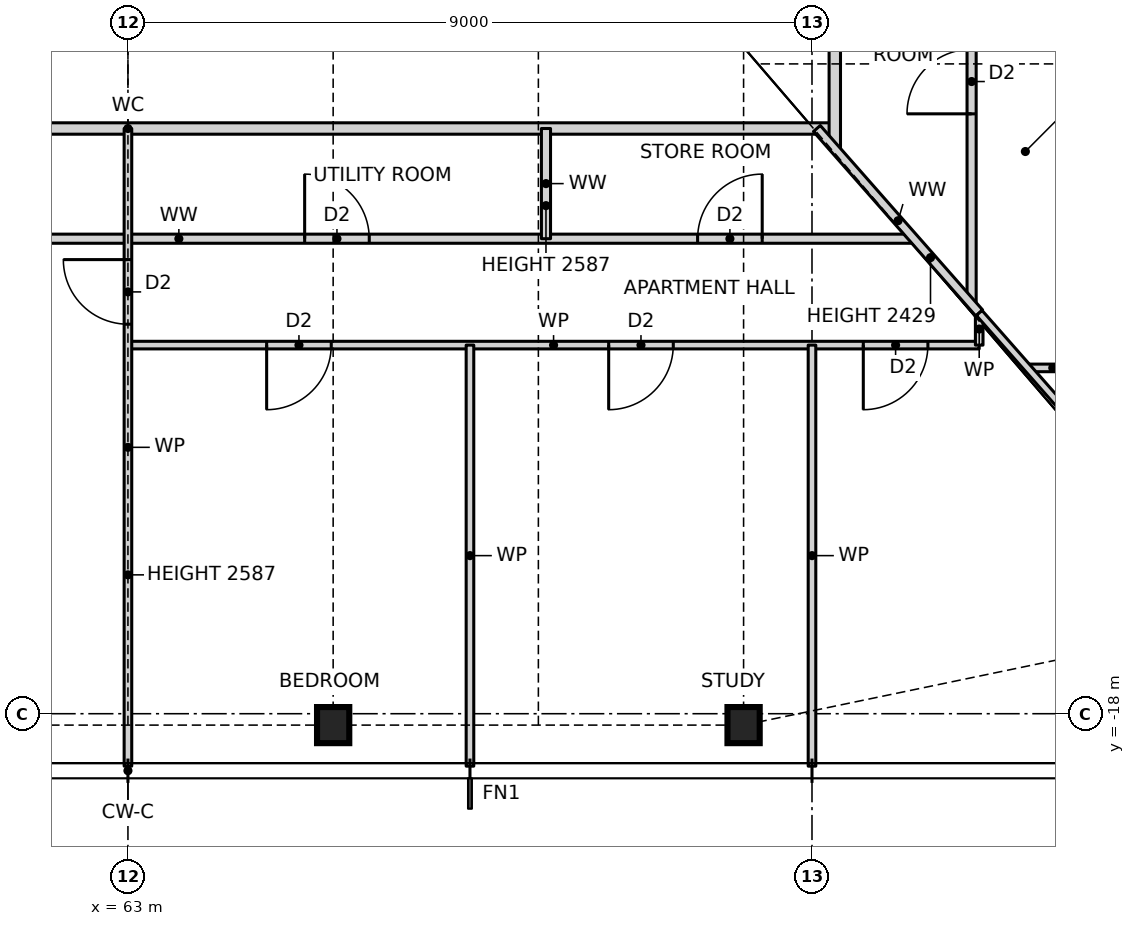
"""IFC4 building model, lengths in metres.
Left out: names, types, materials, properties, quantities, classifications, styles, units other than length and angle.
Written with IfcOpenShell. Run it as: python <this file> out.ifc"""

import sys

from ifc_helpers import new_model, si_unit, direction, frame, frame_2d, origin, origin_2d, place, context, subcontext, project, spatial, rectangle, i_section, extrude, element, fill, save


model = new_model("IFC4")
c1 = context("Model", 3, precision=1e-05, world=origin(), true_north=direction((0.0, 1.0)))
c2 = subcontext(c1, "Body", "Model", "MODEL_VIEW")
j1 = project(units=[si_unit("LENGTHUNIT", "METRE"), si_unit("PLANEANGLEUNIT", "RADIAN")], contexts=[c1])
p1 = place(None, origin())
s1 = spatial("IfcSite", under=j1, at=p1, CompositionType="ELEMENT")
p2 = place(p1, origin())
s2 = spatial("IfcBuilding", under=s1, at=p2, CompositionType="ELEMENT")
p3 = place(p2, frame((0.0, 0.0, 32.5)))
s3 = spatial("IfcBuildingStorey", under=s2, at=p3, CompositionType="ELEMENT", Elevation=32.5)
for number, where, z_axis, x_axis in (
    (1, (65.7, -18.15, 0.0), (0.0, 0.0, 1.0), (1.0, 0.0, 0.0)),
    (2, (71.1, -18.15, 0.0), (0.0, 0.0, 1.0), (1.0, 0.0, 0.0)),
):
    element("IfcColumn", number, at=place(p3, frame(where, z_axis=z_axis, x_axis=x_axis)), inside=s3, PredefinedType="COLUMN", context=c2, shape_type="SweptSolid", body=[
        extrude(i_section(OverallWidth=0.424, OverallDepth=0.475, WebThickness=0.048, FlangeThickness=0.077, at=origin_2d()), origin(), (0.0, 0.0, 1.0), 3.5),
    ])
p4 = place(p3, frame((74.836, -13.45, 0.0), z_axis=(0.0, 0.0, 1.0), x_axis=(1.0, 0.0, 0.0)))
e3 = element("IfcWall", 3, at=p4, inside=s3, PredefinedType="PARTITIONING", context=c2, shape_type="SweptSolid", body=[
    extrude(rectangle(XDim=0.664, YDim=0.1, at=frame_2d((0.332, 0.0))), origin(), (0.0, 0.0, 1.0), 3.27),
])
p5 = place(p3, frame((63.0, -13.15, 0.0), z_axis=(0.0, 0.0, 1.0), x_axis=(1.0, 0.0, 0.0)))
e4 = element("IfcWall", 4, at=p5, inside=s3, PredefinedType="PARTITIONING", context=c2, shape_type="SweptSolid", body=[
    extrude(rectangle(XDim=11.2, YDim=0.1, at=frame_2d((5.6, 0.0))), origin(), (0.0, 0.0, 1.0), 3.27),
])
p6 = place(p5, frame((1.825, 0.0, 0.0)))
e5 = element("IfcOpeningElement", 5, at=p6, cuts=e4, PredefinedType="OPENING", context=c2, shape_type="SweptSolid", body=[
    extrude(rectangle(XDim=0.85, YDim=2.1, at=frame_2d((0.425, 1.05))), frame((0.0, 0.06, 0.0), z_axis=(0.0, -1.0, 0.0), x_axis=(1.0, 0.0, 0.0)), (0.0, 0.0, 1.0), 0.12),
])
p7 = place(p5, frame((6.325, 0.0, 0.0)))
e6 = element("IfcOpeningElement", 6, at=p7, cuts=e4, PredefinedType="OPENING", context=c2, shape_type="SweptSolid", body=[
    extrude(rectangle(XDim=0.85, YDim=2.1, at=frame_2d((0.425, 1.05))), frame((0.0, 0.06, 0.0), z_axis=(0.0, -1.0, 0.0), x_axis=(1.0, 0.0, 0.0)), (0.0, 0.0, 1.0), 0.12),
])
p8 = place(p5, frame((9.675, 0.0, 0.0)))
e7 = element("IfcOpeningElement", 7, at=p8, cuts=e4, PredefinedType="OPENING", context=c2, shape_type="SweptSolid", body=[
    extrude(rectangle(XDim=0.85, YDim=2.1, at=frame_2d((0.425, 1.05))), frame((0.0, 0.06, 0.0), z_axis=(0.0, -1.0, 0.0), x_axis=(1.0, 0.0, 0.0)), (0.0, 0.0, 1.0), 0.12),
])
p9 = place(p3, frame((54.0, -11.75, 0.0), z_axis=(0.0, 0.0, 1.0), x_axis=(1.0, 0.0, 0.0)))
e8 = element("IfcWall", 8, at=p9, inside=s3, PredefinedType="PARTITIONING", context=c2, shape_type="SweptSolid", body=[
    extrude(rectangle(XDim=19.34, YDim=0.12, at=frame_2d((9.67, 0.0))), origin(), (0.0, 0.0, 1.0), 3.27),
])
p10 = place(p9, frame((1.375, 0.0, 0.0)))
e9 = element("IfcOpeningElement", 9, at=p10, cuts=e8, PredefinedType="OPENING", context=c2, shape_type="SweptSolid", body=[
    extrude(rectangle(XDim=0.85, YDim=2.1, at=frame_2d((0.425, 1.05))), frame((0.0, 0.07, 0.0), z_axis=(0.0, -1.0, 0.0), x_axis=(1.0, 0.0, 0.0)), (0.0, 0.0, 1.0), 0.14),
])
p11 = place(p9, frame((4.575, 0.0, 0.0)))
e10 = element("IfcOpeningElement", 10, at=p11, cuts=e8, PredefinedType="OPENING", context=c2, shape_type="SweptSolid", body=[
    extrude(rectangle(XDim=0.85, YDim=2.1, at=frame_2d((0.425, 1.05))), frame((0.0, 0.07, 0.0), z_axis=(0.0, -1.0, 0.0), x_axis=(1.0, 0.0, 0.0)), (0.0, 0.0, 1.0), 0.14),
])
p12 = place(p9, frame((11.325, 0.0, 0.0)))
e11 = element("IfcOpeningElement", 11, at=p12, cuts=e8, PredefinedType="OPENING", context=c2, shape_type="SweptSolid", body=[
    extrude(rectangle(XDim=0.85, YDim=2.1, at=frame_2d((0.425, 1.05))), frame((0.0, 0.07, 0.0), z_axis=(0.0, -1.0, 0.0), x_axis=(1.0, 0.0, 0.0)), (0.0, 0.0, 1.0), 0.14),
])
p13 = place(p9, frame((16.495, 0.0, 0.0)))
e12 = element("IfcOpeningElement", 12, at=p13, cuts=e8, PredefinedType="OPENING", context=c2, shape_type="SweptSolid", body=[
    extrude(rectangle(XDim=0.85, YDim=2.1, at=frame_2d((0.425, 1.05))), frame((0.0, 0.07, 0.0), z_axis=(0.0, -1.0, 0.0), x_axis=(1.0, 0.0, 0.0)), (0.0, 0.0, 1.0), 0.14),
])
p14 = place(p3, frame((53.7, -10.3, 0.0), z_axis=(0.0, 0.0, 1.0), x_axis=(1.0, 0.0, 0.0)))
e13 = element("IfcWall", 13, at=p14, inside=s3, PredefinedType="PARTITIONING", context=c2, shape_type="SweptSolid", body=[
    extrude(rectangle(XDim=18.6, YDim=0.15, at=frame_2d((9.3, 0.0))), origin(), (0.0, 0.0, 1.0), 3.27),
])
p15 = place(p14, frame((4.8, 0.0, 0.0)))
e14 = element("IfcOpeningElement", 14, at=p15, cuts=e13, PredefinedType="OPENING", context=c2, shape_type="SweptSolid", body=[
    extrude(rectangle(XDim=1.0, YDim=2.1, at=frame_2d((0.5, 1.05))), frame((0.0, 0.085, 0.0), z_axis=(0.0, -1.0, 0.0), x_axis=(1.0, 0.0, 0.0)), (0.0, 0.0, 1.0), 0.17),
])
p16 = place(p3, frame((74.2, -13.15, 0.0), z_axis=(0.0, 0.0, 1.0), x_axis=(0.0, 1.0, 0.0)))
e15 = element("IfcWall", 15, at=p16, inside=s3, PredefinedType="PARTITIONING", context=c2, shape_type="SweptSolid", body=[
    extrude(rectangle(XDim=0.423, YDim=0.1, at=frame_2d((0.211, 0.0))), origin(), (0.0, 0.0, 1.0), 3.27),
])
p17 = place(p3, frame((74.1, -12.614, 0.0), z_axis=(0.0, 0.0, 1.0), x_axis=(0.0, 1.0, 0.0)))
e16 = element("IfcWall", 16, at=p17, inside=s3, PredefinedType="PARTITIONING", context=c2, shape_type="SweptSolid", body=[
    extrude(rectangle(XDim=25.228, YDim=0.12, at=frame_2d((12.614, 0.0))), origin(), (0.0, 0.0, 1.0), 3.27),
])
p18 = place(p17, frame((7.239, 0.0, 0.0)))
e17 = element("IfcOpeningElement", 17, at=p18, cuts=e16, PredefinedType="OPENING", context=c2, shape_type="SweptSolid", body=[
    extrude(rectangle(XDim=0.85, YDim=2.1, at=frame_2d((0.425, 1.05))), frame((0.0, 0.07, 0.0), z_axis=(0.0, -1.0, 0.0), x_axis=(1.0, 0.0, 0.0)), (0.0, 0.0, 1.0), 0.14),
])
p19 = place(p17, frame((10.439, 0.0, 0.0)))
e18 = element("IfcOpeningElement", 18, at=p19, cuts=e16, PredefinedType="OPENING", context=c2, shape_type="SweptSolid", body=[
    extrude(rectangle(XDim=0.85, YDim=2.1, at=frame_2d((0.425, 1.05))), frame((0.0, 0.07, 0.0), z_axis=(0.0, -1.0, 0.0), x_axis=(1.0, 0.0, 0.0)), (0.0, 0.0, 1.0), 0.14),
])
p20 = place(p17, frame((2.507, 0.0, 0.0)))
e19 = element("IfcOpeningElement", 19, at=p20, cuts=e16, PredefinedType="OPENING", context=c2, shape_type="SweptSolid", body=[
    extrude(rectangle(XDim=0.85, YDim=2.1, at=frame_2d((0.425, 1.05))), frame((0.0, 0.07, 0.0), z_axis=(0.0, -1.0, 0.0), x_axis=(1.0, 0.0, 0.0)), (0.0, 0.0, 1.0), 0.14),
])
p21 = place(p17, frame((16.639, 0.0, 0.0)))
e20 = element("IfcOpeningElement", 20, at=p21, cuts=e16, PredefinedType="OPENING", context=c2, shape_type="SweptSolid", body=[
    extrude(rectangle(XDim=0.85, YDim=2.1, at=frame_2d((0.425, 1.05))), frame((0.0, 0.07, 0.0), z_axis=(0.0, -1.0, 0.0), x_axis=(1.0, 0.0, 0.0)), (0.0, 0.0, 1.0), 0.14),
])
p22 = place(p17, frame((21.821, 0.0, 0.0)))
e21 = element("IfcOpeningElement", 21, at=p22, cuts=e16, PredefinedType="OPENING", context=c2, shape_type="SweptSolid", body=[
    extrude(rectangle(XDim=0.85, YDim=2.1, at=frame_2d((0.425, 1.05))), frame((0.0, 0.07, 0.0), z_axis=(0.0, -1.0, 0.0), x_axis=(1.0, 0.0, 0.0)), (0.0, 0.0, 1.0), 0.14),
])
p23 = place(p3, frame((72.3, -10.568, 0.0), z_axis=(0.0, 0.0, 1.0), x_axis=(0.0, 1.0, 0.0)))
e22 = element("IfcWall", 22, at=p23, inside=s3, PredefinedType="PARTITIONING", context=c2, shape_type="SweptSolid", body=[
    extrude(rectangle(XDim=21.136, YDim=0.15, at=frame_2d((10.568, 0.0))), origin(), (0.0, 0.0, 1.0), 3.27),
])
p24 = place(p23, frame((8.318, 0.0, 0.0)))
e23 = element("IfcOpeningElement", 23, at=p24, cuts=e22, PredefinedType="OPENING", context=c2, shape_type="SweptSolid", body=[
    extrude(rectangle(XDim=1.0, YDim=2.1, at=frame_2d((0.5, 1.05))), frame((0.0, 0.085, 0.0), z_axis=(0.0, -1.0, 0.0), x_axis=(1.0, 0.0, 0.0)), (0.0, 0.0, 1.0), 0.17),
])
p25 = place(p3, frame((72.0, -18.69, 0.0), z_axis=(0.0, 0.0, 1.0), x_axis=(0.0, 1.0, 0.0)))
e24 = element("IfcWall", 24, at=p25, inside=s3, PredefinedType="PARTITIONING", context=c2, shape_type="SweptSolid", body=[
    extrude(rectangle(XDim=5.54, YDim=0.1, at=frame_2d((2.77, 0.0))), origin(), (0.0, 0.0, 1.0), 3.27),
])
p26 = place(p3, frame((68.5, -11.75, 0.0), z_axis=(0.0, 0.0, 1.0), x_axis=(0.0, 1.0, 0.0)))
e25 = element("IfcWall", 25, at=p26, inside=s3, PredefinedType="PARTITIONING", context=c2, shape_type="SweptSolid", body=[
    extrude(rectangle(XDim=1.45, YDim=0.12, at=frame_2d((0.725, 0.0))), origin(), (0.0, 0.0, 1.0), 2.587),
])
p27 = place(p3, frame((67.5, -18.69, 0.0), z_axis=(0.0, 0.0, 1.0), x_axis=(0.0, 1.0, 0.0)))
e26 = element("IfcWall", 26, at=p27, inside=s3, PredefinedType="PARTITIONING", context=c2, shape_type="SweptSolid", body=[
    extrude(rectangle(XDim=5.54, YDim=0.1, at=frame_2d((2.77, 0.0))), origin(), (0.0, 0.0, 1.0), 3.27),
])
p28 = place(p3, frame((63.0, -18.69, 0.0), z_axis=(0.0, 0.0, 1.0), x_axis=(0.0, 1.0, 0.0)))
e27 = element("IfcWall", 27, at=p28, inside=s3, PredefinedType="PARTITIONING", context=c2, shape_type="SweptSolid", body=[
    extrude(rectangle(XDim=8.39, YDim=0.1, at=frame_2d((4.195, 0.0))), origin(), (0.0, 0.0, 1.0), 2.587),
])
p29 = place(p28, frame((5.815, 0.0, 0.0)))
e28 = element("IfcOpeningElement", 28, at=p29, cuts=e27, PredefinedType="OPENING", context=c2, shape_type="SweptSolid", body=[
    extrude(rectangle(XDim=0.85, YDim=2.1, at=frame_2d((0.425, 1.05))), frame((0.0, 0.06, 0.0), z_axis=(0.0, -1.0, 0.0), x_axis=(1.0, 0.0, 0.0)), (0.0, 0.0, 1.0), 0.12),
])
p30 = place(p3, frame((74.2, -12.727, 0.0), z_axis=(0.0, 0.0, 1.0), x_axis=(-0.660667046586, 0.75067906162, 0.0)))
e29 = element("IfcWall", 29, at=p30, inside=s3, PredefinedType="PARTITIONING", context=c2, shape_type="SweptSolid", body=[
    extrude(rectangle(XDim=3.233, YDim=0.12, at=frame_2d((1.617, 0.0))), origin(), (0.0, 0.0, 1.0), 2.429),
])
p31 = place(p3, frame((78.057, -17.109, 0.0), z_axis=(0.0, 0.0, 1.0), x_axis=(-0.660698595885, 0.750651294141, 0.0)))
e30 = element("IfcWall", 30, at=p31, inside=s3, PredefinedType="PARTITIONING", context=c2, shape_type="SweptSolid", body=[
    extrude(rectangle(XDim=5.838, YDim=0.1, at=frame_2d((2.919, 0.0))), origin(), (0.0, 0.0, 1.0), 2.429),
])
p32 = place(p29, origin())
e31 = element("IfcDoor", 31, at=p32, inside=s3, OperationType="SINGLE_SWING_RIGHT", PredefinedType="DOOR", context=c2, shape_type="SweptSolid", body=[
    extrude(rectangle(XDim=0.85, YDim=2.1, at=frame_2d((0.425, 1.05))), frame((0.0, 0.025, 0.0), z_axis=(0.0, -1.0, 0.0), x_axis=(1.0, 0.0, 0.0)), (0.0, 0.0, 1.0), 0.05),
])
fill(e28, e31)
p33 = place(p6, frame((0.85, 0.0, 0.0), z_axis=(0.0, 0.0, 1.0), x_axis=(-1.0, 0.0, 0.0)))
e32 = element("IfcDoor", 32, at=p33, inside=s3, OperationType="SINGLE_SWING_RIGHT", PredefinedType="DOOR", context=c2, shape_type="SweptSolid", body=[
    extrude(rectangle(XDim=0.85, YDim=2.1, at=frame_2d((0.425, 1.05))), frame((0.0, 0.025, 0.0), z_axis=(0.0, -1.0, 0.0), x_axis=(1.0, 0.0, 0.0)), (0.0, 0.0, 1.0), 0.05),
])
fill(e5, e32)
p34 = place(p7, frame((0.85, 0.0, 0.0), z_axis=(0.0, 0.0, 1.0), x_axis=(-1.0, 0.0, 0.0)))
e33 = element("IfcDoor", 33, at=p34, inside=s3, OperationType="SINGLE_SWING_RIGHT", PredefinedType="DOOR", context=c2, shape_type="SweptSolid", body=[
    extrude(rectangle(XDim=0.85, YDim=2.1, at=frame_2d((0.425, 1.05))), frame((0.0, 0.025, 0.0), z_axis=(0.0, -1.0, 0.0), x_axis=(1.0, 0.0, 0.0)), (0.0, 0.0, 1.0), 0.05),
])
fill(e6, e33)
p35 = place(p8, frame((0.85, 0.0, 0.0), z_axis=(0.0, 0.0, 1.0), x_axis=(-1.0, 0.0, 0.0)))
e34 = element("IfcDoor", 34, at=p35, inside=s3, OperationType="SINGLE_SWING_RIGHT", PredefinedType="DOOR", context=c2, shape_type="SweptSolid", body=[
    extrude(rectangle(XDim=0.85, YDim=2.1, at=frame_2d((0.425, 1.05))), frame((0.0, 0.025, 0.0), z_axis=(0.0, -1.0, 0.0), x_axis=(1.0, 0.0, 0.0)), (0.0, 0.0, 1.0), 0.05),
])
fill(e7, e34)
p36 = place(p12, origin())
e35 = element("IfcDoor", 35, at=p36, inside=s3, OperationType="SINGLE_SWING_LEFT", PredefinedType="DOOR", context=c2, shape_type="SweptSolid", body=[
    extrude(rectangle(XDim=0.85, YDim=2.1, at=frame_2d((0.425, 1.05))), frame((0.0, 0.025, 0.0), z_axis=(0.0, -1.0, 0.0), x_axis=(1.0, 0.0, 0.0)), (0.0, 0.0, 1.0), 0.05),
])
fill(e11, e35)
p37 = place(p13, origin())
e36 = element("IfcDoor", 36, at=p37, inside=s3, OperationType="SINGLE_SWING_RIGHT", PredefinedType="DOOR", context=c2, shape_type="SweptSolid", body=[
    extrude(rectangle(XDim=0.85, YDim=2.1, at=frame_2d((0.425, 1.05))), frame((0.0, 0.025, 0.0), z_axis=(0.0, -1.0, 0.0), x_axis=(1.0, 0.0, 0.0)), (0.0, 0.0, 1.0), 0.05),
])
fill(e12, e36)
p38 = place(p20, origin())
e37 = element("IfcDoor", 37, at=p38, inside=s3, OperationType="SINGLE_SWING_LEFT", PredefinedType="DOOR", context=c2, shape_type="SweptSolid", body=[
    extrude(rectangle(XDim=0.85, YDim=2.1, at=frame_2d((0.425, 1.05))), frame((0.0, 0.025, 0.0), z_axis=(0.0, -1.0, 0.0), x_axis=(1.0, 0.0, 0.0)), (0.0, 0.0, 1.0), 0.05),
])
fill(e19, e37)
save(model, sys.argv[1])
